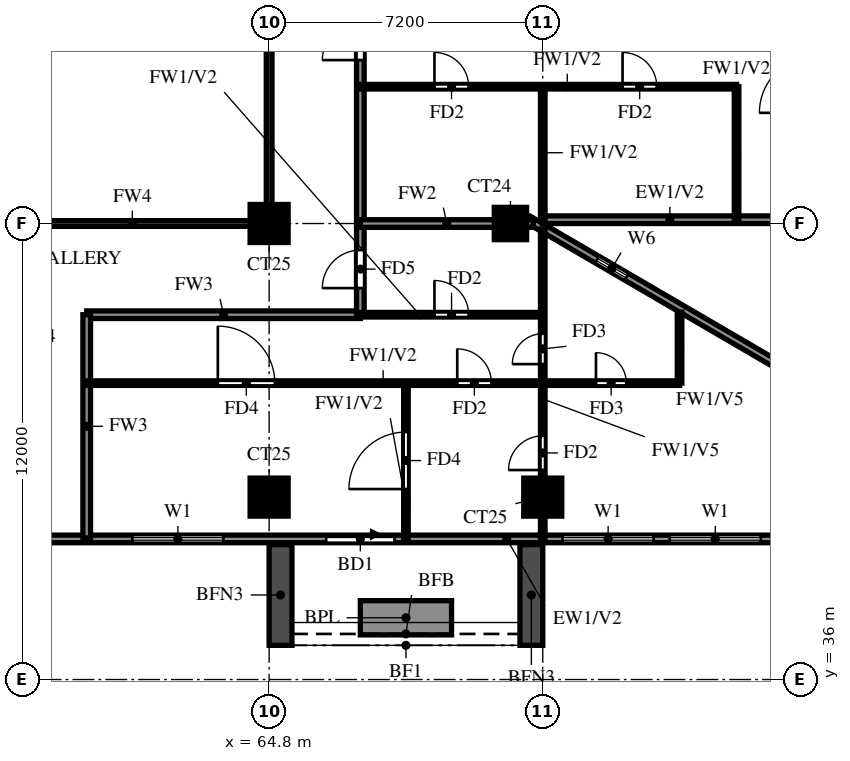
"""IFC4 building model, lengths in metres.
Left out: names, types, materials, properties, quantities, classifications, styles, units other than length and angle.
Written with IfcOpenShell. Run it as: python <this file> out.ifc"""

import sys

from ifc_helpers import new_model, si_unit, direction, frame, frame_2d, origin, origin_2d, place, context, subcontext, project, spatial, rectangle, extrude, source, transform, mapped, element, fill, save


model = new_model("IFC4")
c1 = context("Model", 3, precision=1e-05, world=origin(), true_north=direction((0.0, 1.0)))
c2 = subcontext(c1, "Body", "Model", "MODEL_VIEW")
j1 = project(units=[si_unit("LENGTHUNIT", "METRE"), si_unit("PLANEANGLEUNIT", "RADIAN")], contexts=[c1])
p1 = place(None, origin())
s1 = spatial("IfcSite", under=j1, at=p1, CompositionType="ELEMENT")
p2 = place(p1, origin())
s2 = spatial("IfcBuilding", under=s1, at=p2, CompositionType="ELEMENT")
p3 = place(p2, frame((0.0, 0.0, 167.5)))
s3 = spatial("IfcBuildingStorey", under=s2, at=p3, CompositionType="ELEMENT", Elevation=167.5)
m1 = source(origin(), c2, "Body", "SweptSolid", [
    extrude(rectangle(XDim=1.0, YDim=1.0, at=origin_2d()), origin(), (0.0, 0.0, 1.0), 3.2),
])
for number, where, z_axis, x_axis in (
    (1, (64.8, 40.8, 0.0), (0.0, 0.0, 1.0), (1.0, 0.0, 0.0)),
    (2, (72.0, 40.8, 0.0), (0.0, 0.0, 1.0), (1.0, 0.0, 0.0)),
    (3, (64.8, 48.0, 0.0), (0.0, 0.0, 1.0), (1.0, 0.0, 0.0)),
):
    element("IfcColumn", number, at=place(p3, frame(where, z_axis=z_axis, x_axis=x_axis)), inside=s3, PredefinedType="COLUMN", context=c2, shape_type="MappedRepresentation", body=[
        mapped(m1, transform((0.0, 0.0, 0.0))),
    ])
m2 = source(origin(), c2, "Body", "SweptSolid", [
    extrude(rectangle(XDim=0.85, YDim=0.85, at=origin_2d()), origin(), (0.0, 0.0, 1.0), 3.2),
])
p4 = place(p3, frame((71.15, 48.0, 0.0), z_axis=(0.0, 0.0, 1.0), x_axis=(1.0, 0.0, 0.0)))
e4 = element("IfcColumn", 4, at=p4, inside=s3, PredefinedType="COLUMN", context=c2, shape_type="MappedRepresentation", body=[
    mapped(m2, transform((0.0, 0.0, 0.0))),
])
p5 = place(p3, frame((85.719, 39.881, 0.0), z_axis=(0.0, 0.0, 1.0), x_axis=(-0.86377618652, 0.503875678716, 0.0)))
e5 = element("IfcWall", 5, at=p5, inside=s3, PredefinedType="SOLIDWALL", context=c2, shape_type="SweptSolid", body=[
    extrude(rectangle(XDim=16.311, YDim=0.2, at=frame_2d((8.156, 0.0))), origin(), (0.0, 0.0, 1.0), 3.2),
])
p6 = place(p5, frame((13.326, 0.0, 1.5)))
e6 = element("IfcOpeningElement", 6, at=p6, cuts=e5, PredefinedType="OPENING", context=c2, shape_type="SweptSolid", body=[
    extrude(rectangle(XDim=0.9, YDim=0.9, at=frame_2d((0.45, 0.45))), frame((0.0, 0.11, 0.0), z_axis=(0.0, -1.0, 0.0), x_axis=(1.0, 0.0, 0.0)), (0.0, 0.0, 1.0), 0.22),
])
p7 = place(p3, frame((71.99, 48.1, 0.0), z_axis=(0.0, 0.0, 1.0), x_axis=(1.0, 0.0, 0.0)))
e7 = element("IfcWall", 7, at=p7, inside=s3, PredefinedType="SOLIDWALL", context=c2, shape_type="SweptSolid", body=[
    extrude(rectangle(XDim=6.71, YDim=0.2, at=frame_2d((3.355, 0.0))), origin(), (0.0, 0.0, 1.0), 3.2),
])
p8 = place(p3, frame((58.8, 39.7, 0.0), z_axis=(0.0, 0.0, 1.0), x_axis=(1.0, 0.0, 0.0)))
e8 = element("IfcWall", 8, at=p8, inside=s3, PredefinedType="SOLIDWALL", context=c2, shape_type="SweptSolid", body=[
    extrude(rectangle(XDim=27.23, YDim=0.2, at=frame_2d((13.615, 0.0))), origin(), (0.0, 0.0, 1.0), 3.2),
])
p9 = place(p8, frame((7.5, 0.0, 0.0)))
e9 = element("IfcOpeningElement", 9, at=p9, cuts=e8, PredefinedType="OPENING", context=c2, shape_type="SweptSolid", body=[
    extrude(rectangle(XDim=1.8, YDim=2.4, at=frame_2d((0.9, 1.2))), frame((0.0, 0.11, 0.0), z_axis=(0.0, -1.0, 0.0), x_axis=(1.0, 0.0, 0.0)), (0.0, 0.0, 1.0), 0.22),
])
p10 = place(p8, frame((2.4, 0.0, 0.6)))
e10 = element("IfcOpeningElement", 10, at=p10, cuts=e8, PredefinedType="OPENING", context=c2, shape_type="SweptSolid", body=[
    extrude(rectangle(XDim=2.4, YDim=2.4, at=frame_2d((1.2, 1.2))), frame((0.0, 0.11, 0.0), z_axis=(0.0, -1.0, 0.0), x_axis=(1.0, 0.0, 0.0)), (0.0, 0.0, 1.0), 0.22),
])
p11 = place(p8, frame((13.72, 0.0, 0.6)))
e11 = element("IfcOpeningElement", 11, at=p11, cuts=e8, PredefinedType="OPENING", context=c2, shape_type="SweptSolid", body=[
    extrude(rectangle(XDim=2.4, YDim=2.4, at=frame_2d((1.2, 1.2))), frame((0.0, 0.11, 0.0), z_axis=(0.0, -1.0, 0.0), x_axis=(1.0, 0.0, 0.0)), (0.0, 0.0, 1.0), 0.22),
])
p12 = place(p8, frame((16.541, 0.0, 0.6)))
e12 = element("IfcOpeningElement", 12, at=p12, cuts=e8, PredefinedType="OPENING", context=c2, shape_type="SweptSolid", body=[
    extrude(rectangle(XDim=2.4, YDim=2.4, at=frame_2d((1.2, 1.2))), frame((0.0, 0.11, 0.0), z_axis=(0.0, -1.0, 0.0), x_axis=(1.0, 0.0, 0.0)), (0.0, 0.0, 1.0), 0.22),
])
p13 = place(p8, frame((19.361, 0.0, 0.6)))
e13 = element("IfcOpeningElement", 13, at=p13, cuts=e8, PredefinedType="OPENING", context=c2, shape_type="SweptSolid", body=[
    extrude(rectangle(XDim=2.4, YDim=2.4, at=frame_2d((1.2, 1.2))), frame((0.0, 0.11, 0.0), z_axis=(0.0, -1.0, 0.0), x_axis=(1.0, 0.0, 0.0)), (0.0, 0.0, 1.0), 0.22),
])
p14 = place(p8, frame((22.181, 0.0, 0.6)))
e14 = element("IfcOpeningElement", 14, at=p14, cuts=e8, PredefinedType="OPENING", context=c2, shape_type="SweptSolid", body=[
    extrude(rectangle(XDim=2.4, YDim=2.4, at=frame_2d((1.2, 1.2))), frame((0.0, 0.11, 0.0), z_axis=(0.0, -1.0, 0.0), x_axis=(1.0, 0.0, 0.0)), (0.0, 0.0, 1.0), 0.22),
])
p15 = place(p8, frame((25.99, 0.0, 0.6)))
e15 = element("IfcOpeningElement", 15, at=p15, cuts=e8, PredefinedType="OPENING", context=c2, shape_type="SweptSolid", body=[
    extrude(rectangle(XDim=0.9, YDim=2.4, at=frame_2d((0.45, 1.2))), frame((0.0, 0.11, 0.0), z_axis=(0.0, -1.0, 0.0), x_axis=(1.0, 0.0, 0.0)), (0.0, 0.0, 1.0), 0.22),
])
for number, where, z_axis, x_axis in (
    (16, (65.1, 39.55, 0.0), (0.0, 0.0, 1.0), (0.0, -1.0, 0.0)),
    (17, (71.7, 39.55, 0.0), (0.0, 0.0, 1.0), (0.0, -1.0, 0.0)),
):
    element("IfcWall", number, at=place(p3, frame(where, z_axis=z_axis, x_axis=x_axis)), inside=s3, PredefinedType="SOLIDWALL", context=c2, shape_type="SweptSolid", body=[
        extrude(rectangle(XDim=2.65, YDim=0.6, at=frame_2d((1.325, 0.0))), origin(), (0.0, 0.0, 1.0), 2.85),
    ])
p16 = place(p3, frame((67.2, 37.625, 0.0), z_axis=(0.0, 0.0, 1.0), x_axis=(1.0, 0.0, 0.0)))
e18 = element("IfcWall", 18, at=p16, inside=s3, PredefinedType="SOLIDWALL", context=c2, shape_type="SweptSolid", body=[
    extrude(rectangle(XDim=2.4, YDim=0.9, at=frame_2d((1.2, 0.0))), origin(), (0.0, 0.0, 1.0), 0.9),
])
p17 = place(p3, frame((60.0, 45.6, 0.0), z_axis=(0.0, 0.0, 1.0), x_axis=(1.0, 0.0, 0.0)))
e19 = element("IfcWall", 19, at=p17, inside=s3, PredefinedType="SOLIDWALL", context=c2, shape_type="SweptSolid", body=[
    extrude(rectangle(XDim=7.2, YDim=0.2, at=frame_2d((3.6, 0.0))), origin(), (0.0, 0.0, 1.0), 3.2),
])
p18 = place(p3, frame((60.0, 39.725, 0.0), z_axis=(0.0, 0.0, 1.0), x_axis=(0.0, 1.0, 0.0)))
e20 = element("IfcWall", 20, at=p18, inside=s3, PredefinedType="SOLIDWALL", context=c2, shape_type="SweptSolid", body=[
    extrude(rectangle(XDim=5.875, YDim=0.2, at=frame_2d((2.938, 0.0))), origin(), (0.0, 0.0, 1.0), 3.2),
])
p19 = place(p3, frame((67.2, 45.6, 0.0), z_axis=(0.0, 0.0, 1.0), x_axis=(0.0, 1.0, 0.0)))
e21 = element("IfcWall", 21, at=p19, inside=s3, PredefinedType="SOLIDWALL", context=c2, shape_type="SweptSolid", body=[
    extrude(rectangle(XDim=16.8, YDim=0.2, at=frame_2d((8.4, 0.0))), origin(), (0.0, 0.0, 1.0), 3.2),
])
p20 = place(p19, frame((6.7, 0.0, 0.0)))
e22 = element("IfcOpeningElement", 22, at=p20, cuts=e21, PredefinedType="OPENING", context=c2, shape_type="SweptSolid", body=[
    extrude(rectangle(XDim=1.0, YDim=2.1, at=frame_2d((0.5, 1.05))), frame((0.0, 0.11, 0.0), z_axis=(0.0, -1.0, 0.0), x_axis=(1.0, 0.0, 0.0)), (0.0, 0.0, 1.0), 0.22),
])
p21 = place(p19, frame((15.1, 0.0, 0.0)))
e23 = element("IfcOpeningElement", 23, at=p21, cuts=e21, PredefinedType="OPENING", context=c2, shape_type="SweptSolid", body=[
    extrude(rectangle(XDim=1.0, YDim=2.1, at=frame_2d((0.5, 1.05))), frame((0.0, 0.11, 0.0), z_axis=(0.0, -1.0, 0.0), x_axis=(1.0, 0.0, 0.0)), (0.0, 0.0, 1.0), 0.22),
])
p22 = place(p19, frame((0.7, 0.0, 0.0)))
e24 = element("IfcOpeningElement", 24, at=p22, cuts=e21, PredefinedType="OPENING", context=c2, shape_type="SweptSolid", body=[
    extrude(rectangle(XDim=1.0, YDim=2.1, at=frame_2d((0.5, 1.05))), frame((0.0, 0.11, 0.0), z_axis=(0.0, -1.0, 0.0), x_axis=(1.0, 0.0, 0.0)), (0.0, 0.0, 1.0), 0.22),
])
p23 = place(p3, frame((67.2, 48.0, 0.0), z_axis=(0.0, 0.0, 1.0), x_axis=(1.0, 0.0, 0.0)))
e25 = element("IfcWall", 25, at=p23, inside=s3, PredefinedType="SOLIDWALL", context=c2, shape_type="SweptSolid", body=[
    extrude(rectangle(XDim=4.552, YDim=0.2, at=frame_2d((2.276, 0.0))), origin(), (0.0, 0.0, 1.0), 3.2),
])
p24 = place(p3, frame((60.0, 43.8, 0.0), z_axis=(0.0, 0.0, 1.0), x_axis=(1.0, 0.0, 0.0)))
e26 = element("IfcWall", 26, at=p24, inside=s3, PredefinedType="PARTITIONING", context=c2, shape_type="SweptSolid", body=[
    extrude(rectangle(XDim=15.6, YDim=0.12, at=frame_2d((7.8, 0.0))), origin(), (0.0, 0.0, 1.0), 3.2),
])
p25 = place(p24, frame((9.75, 0.0, 0.0)))
e27 = element("IfcOpeningElement", 27, at=p25, cuts=e26, PredefinedType="OPENING", context=c2, shape_type="SweptSolid", body=[
    extrude(rectangle(XDim=0.9, YDim=2.1, at=frame_2d((0.45, 1.05))), frame((0.0, 0.07, 0.0), z_axis=(0.0, -1.0, 0.0), x_axis=(1.0, 0.0, 0.0)), (0.0, 0.0, 1.0), 0.14),
])
p26 = place(p24, frame((3.45, 0.0, 0.0)))
e28 = element("IfcOpeningElement", 28, at=p26, cuts=e26, PredefinedType="OPENING", context=c2, shape_type="SweptSolid", body=[
    extrude(rectangle(XDim=1.5, YDim=2.1, at=frame_2d((0.75, 1.05))), frame((0.0, 0.07, 0.0), z_axis=(0.0, -1.0, 0.0), x_axis=(1.0, 0.0, 0.0)), (0.0, 0.0, 1.0), 0.14),
])
p27 = place(p24, frame((13.4, 0.0, 0.0)))
e29 = element("IfcOpeningElement", 29, at=p27, cuts=e26, PredefinedType="OPENING", context=c2, shape_type="SweptSolid", body=[
    extrude(rectangle(XDim=0.8, YDim=2.1, at=frame_2d((0.4, 1.05))), frame((0.0, 0.07, 0.0), z_axis=(0.0, -1.0, 0.0), x_axis=(1.0, 0.0, 0.0)), (0.0, 0.0, 1.0), 0.14),
])
p28 = place(p3, frame((67.2, 45.6, 0.0), z_axis=(0.0, 0.0, 1.0), x_axis=(1.0, 0.0, 0.0)))
e30 = element("IfcWall", 30, at=p28, inside=s3, PredefinedType="PARTITIONING", context=c2, shape_type="SweptSolid", body=[
    extrude(rectangle(XDim=4.8, YDim=0.12, at=frame_2d((2.4, 0.0))), origin(), (0.0, 0.0, 1.0), 3.2),
])
p29 = place(p28, frame((1.95, 0.0, 0.0)))
e31 = element("IfcOpeningElement", 31, at=p29, cuts=e30, PredefinedType="OPENING", context=c2, shape_type="SweptSolid", body=[
    extrude(rectangle(XDim=0.9, YDim=2.1, at=frame_2d((0.45, 1.05))), frame((0.0, 0.07, 0.0), z_axis=(0.0, -1.0, 0.0), x_axis=(1.0, 0.0, 0.0)), (0.0, 0.0, 1.0), 0.14),
])
p30 = place(p3, frame((67.2, 51.6, 0.0), z_axis=(0.0, 0.0, 1.0), x_axis=(1.0, 0.0, 0.0)))
e32 = element("IfcWall", 32, at=p30, inside=s3, PredefinedType="PARTITIONING", context=c2, shape_type="SweptSolid", body=[
    extrude(rectangle(XDim=9.9, YDim=0.12, at=frame_2d((4.95, 0.0))), origin(), (0.0, 0.0, 1.0), 3.2),
])
p31 = place(p30, frame((6.9, 0.0, 0.0)))
e33 = element("IfcOpeningElement", 33, at=p31, cuts=e32, PredefinedType="OPENING", context=c2, shape_type="SweptSolid", body=[
    extrude(rectangle(XDim=0.9, YDim=2.1, at=frame_2d((0.45, 1.05))), frame((0.0, 0.07, 0.0), z_axis=(0.0, -1.0, 0.0), x_axis=(1.0, 0.0, 0.0)), (0.0, 0.0, 1.0), 0.14),
])
p32 = place(p30, frame((1.95, 0.0, 0.0)))
e34 = element("IfcOpeningElement", 34, at=p32, cuts=e32, PredefinedType="OPENING", context=c2, shape_type="SweptSolid", body=[
    extrude(rectangle(XDim=0.9, YDim=2.1, at=frame_2d((0.45, 1.05))), frame((0.0, 0.07, 0.0), z_axis=(0.0, -1.0, 0.0), x_axis=(1.0, 0.0, 0.0)), (0.0, 0.0, 1.0), 0.14),
])
p33 = place(p3, frame((68.4, 39.725, 0.0), z_axis=(0.0, 0.0, 1.0), x_axis=(0.0, 1.0, 0.0)))
e35 = element("IfcWall", 35, at=p33, inside=s3, PredefinedType="PARTITIONING", context=c2, shape_type="SweptSolid", body=[
    extrude(rectangle(XDim=4.075, YDim=0.12, at=frame_2d((2.038, 0.0))), origin(), (0.0, 0.0, 1.0), 3.2),
])
p34 = place(p33, frame((1.288, 0.0, 0.0)))
e36 = element("IfcOpeningElement", 36, at=p34, cuts=e35, PredefinedType="OPENING", context=c2, shape_type="SweptSolid", body=[
    extrude(rectangle(XDim=1.5, YDim=2.1, at=frame_2d((0.75, 1.05))), frame((0.0, 0.07, 0.0), z_axis=(0.0, -1.0, 0.0), x_axis=(1.0, 0.0, 0.0)), (0.0, 0.0, 1.0), 0.14),
])
p35 = place(p3, frame((72.0, 39.725, 0.0), z_axis=(0.0, 0.0, 1.0), x_axis=(0.0, 1.0, 0.0)))
e37 = element("IfcWall", 37, at=p35, inside=s3, PredefinedType="PARTITIONING", context=c2, shape_type="SweptSolid", body=[
    extrude(rectangle(XDim=8.13, YDim=0.12, at=frame_2d((4.065, 0.0))), origin(), (0.0, 0.0, 1.0), 2.3),
])
p36 = place(p35, frame((1.788, 0.0, 0.0)))
e38 = element("IfcOpeningElement", 38, at=p36, cuts=e37, PredefinedType="OPENING", context=c2, shape_type="SweptSolid", body=[
    extrude(rectangle(XDim=0.9, YDim=2.1, at=frame_2d((0.45, 1.05))), frame((0.0, 0.07, 0.0), z_axis=(0.0, -1.0, 0.0), x_axis=(1.0, 0.0, 0.0)), (0.0, 0.0, 1.0), 0.14),
])
p37 = place(p35, frame((4.575, 0.0, 0.0)))
e39 = element("IfcOpeningElement", 39, at=p37, cuts=e37, PredefinedType="OPENING", context=c2, shape_type="SweptSolid", body=[
    extrude(rectangle(XDim=0.8, YDim=2.1, at=frame_2d((0.4, 1.05))), frame((0.0, 0.07, 0.0), z_axis=(0.0, -1.0, 0.0), x_axis=(1.0, 0.0, 0.0)), (0.0, 0.0, 1.0), 0.14),
])
p38 = place(p3, frame((72.0, 48.125, 0.0), z_axis=(0.0, 0.0, 1.0), x_axis=(0.0, 1.0, 0.0)))
e40 = element("IfcWall", 40, at=p38, inside=s3, PredefinedType="PARTITIONING", context=c2, shape_type="SweptSolid", body=[
    extrude(rectangle(XDim=3.475, YDim=0.12, at=frame_2d((1.738, 0.0))), origin(), (0.0, 0.0, 1.0), 3.2),
])
p39 = place(p3, frame((75.6, 43.8, 0.0), z_axis=(0.0, 0.0, 1.0), x_axis=(0.0, 1.0, 0.0)))
e41 = element("IfcWall", 41, at=p39, inside=s3, PredefinedType="PARTITIONING", context=c2, shape_type="SweptSolid", body=[
    extrude(rectangle(XDim=1.868, YDim=0.12, at=frame_2d((0.934, 0.0))), origin(), (0.0, 0.0, 1.0), 2.3),
])
p40 = place(p3, frame((77.1, 48.125, 0.0), z_axis=(0.0, 0.0, 1.0), x_axis=(0.0, 1.0, 0.0)))
e42 = element("IfcWall", 42, at=p40, inside=s3, PredefinedType="PARTITIONING", context=c2, shape_type="SweptSolid", body=[
    extrude(rectangle(XDim=3.475, YDim=0.12, at=frame_2d((1.738, 0.0))), origin(), (0.0, 0.0, 1.0), 3.2),
])
p41 = place(p3, frame((57.6, 48.0, 0.0), z_axis=(0.0, 0.0, 1.0), x_axis=(1.0, 0.0, 0.0)))
e43 = element("IfcWall", 43, at=p41, inside=s3, PredefinedType="SOLIDWALL", context=c2, shape_type="SweptSolid", body=[
    extrude(rectangle(XDim=7.2, YDim=0.15, at=frame_2d((3.6, 0.0))), origin(), (0.0, 0.0, 1.0), 2.3),
])
p42 = place(p3, frame((64.8, 48.0, 0.0), z_axis=(0.0, 0.0, 1.0), x_axis=(0.0, 1.0, 0.0)))
e44 = element("IfcWall", 44, at=p42, inside=s3, PredefinedType="SOLIDWALL", context=c2, shape_type="SweptSolid", body=[
    extrude(rectangle(XDim=14.4, YDim=0.15, at=frame_2d((7.2, 0.0))), origin(), (0.0, 0.0, 1.0), 2.3),
])
p43 = place(p6, origin())
e45 = element("IfcWindow", 45, at=p43, inside=s3, PartitioningType="SINGLE_PANEL", PredefinedType="WINDOW", context=c2, shape_type="SweptSolid", body=[
    extrude(rectangle(XDim=0.9, YDim=0.9, at=frame_2d((0.45, 0.45))), frame((0.0, 0.03, 0.0), z_axis=(0.0, -1.0, 0.0), x_axis=(1.0, 0.0, 0.0)), (0.0, 0.0, 1.0), 0.06),
])
fill(e6, e45)
p44 = place(p9, origin())
e46 = element("IfcDoor", 46, at=p44, inside=s3, OperationType="DOUBLE_DOOR_SLIDING", PredefinedType="DOOR", context=c2, shape_type="SweptSolid", body=[
    extrude(rectangle(XDim=1.8, YDim=2.4, at=frame_2d((0.9, 1.2))), frame((0.0, 0.025, 0.0), z_axis=(0.0, -1.0, 0.0), x_axis=(1.0, 0.0, 0.0)), (0.0, 0.0, 1.0), 0.05),
])
fill(e9, e46)
p45 = place(p10, origin())
e47 = element("IfcWindow", 47, at=p45, inside=s3, PartitioningType="DOUBLE_PANEL_VERTICAL", PredefinedType="WINDOW", context=c2, shape_type="SweptSolid", body=[
    extrude(rectangle(XDim=2.4, YDim=2.4, at=frame_2d((1.2, 1.2))), frame((0.0, 0.03, 0.0), z_axis=(0.0, -1.0, 0.0), x_axis=(1.0, 0.0, 0.0)), (0.0, 0.0, 1.0), 0.06),
])
fill(e10, e47)
p46 = place(p11, origin())
e48 = element("IfcWindow", 48, at=p46, inside=s3, PartitioningType="DOUBLE_PANEL_VERTICAL", PredefinedType="WINDOW", context=c2, shape_type="SweptSolid", body=[
    extrude(rectangle(XDim=2.4, YDim=2.4, at=frame_2d((1.2, 1.2))), frame((0.0, 0.03, 0.0), z_axis=(0.0, -1.0, 0.0), x_axis=(1.0, 0.0, 0.0)), (0.0, 0.0, 1.0), 0.06),
])
fill(e11, e48)
p47 = place(p12, origin())
e49 = element("IfcWindow", 49, at=p47, inside=s3, PartitioningType="DOUBLE_PANEL_VERTICAL", PredefinedType="WINDOW", context=c2, shape_type="SweptSolid", body=[
    extrude(rectangle(XDim=2.4, YDim=2.4, at=frame_2d((1.2, 1.2))), frame((0.0, 0.03, 0.0), z_axis=(0.0, -1.0, 0.0), x_axis=(1.0, 0.0, 0.0)), (0.0, 0.0, 1.0), 0.06),
])
fill(e12, e49)
p48 = place(p20, origin())
e50 = element("IfcDoor", 50, at=p48, inside=s3, OperationType="SINGLE_SWING_LEFT", PredefinedType="DOOR", context=c2, shape_type="SweptSolid", body=[
    extrude(rectangle(XDim=1.0, YDim=2.1, at=frame_2d((0.5, 1.05))), frame((0.0, 0.025, 0.0), z_axis=(0.0, -1.0, 0.0), x_axis=(1.0, 0.0, 0.0)), (0.0, 0.0, 1.0), 0.05),
])
fill(e22, e50)
p49 = place(p31, origin())
e51 = element("IfcDoor", 51, at=p49, inside=s3, OperationType="SINGLE_SWING_RIGHT", PredefinedType="DOOR", context=c2, shape_type="SweptSolid", body=[
    extrude(rectangle(XDim=0.9, YDim=2.1, at=frame_2d((0.45, 1.05))), frame((0.0, 0.025, 0.0), z_axis=(0.0, -1.0, 0.0), x_axis=(1.0, 0.0, 0.0)), (0.0, 0.0, 1.0), 0.05),
])
fill(e33, e51)
p50 = place(p32, origin())
e52 = element("IfcDoor", 52, at=p50, inside=s3, OperationType="SINGLE_SWING_RIGHT", PredefinedType="DOOR", context=c2, shape_type="SweptSolid", body=[
    extrude(rectangle(XDim=0.9, YDim=2.1, at=frame_2d((0.45, 1.05))), frame((0.0, 0.025, 0.0), z_axis=(0.0, -1.0, 0.0), x_axis=(1.0, 0.0, 0.0)), (0.0, 0.0, 1.0), 0.05),
])
fill(e34, e52)
p51 = place(p34, origin())
e53 = element("IfcDoor", 53, at=p51, inside=s3, OperationType="SINGLE_SWING_RIGHT", PredefinedType="DOOR", context=c2, shape_type="SweptSolid", body=[
    extrude(rectangle(XDim=1.5, YDim=2.1, at=frame_2d((0.75, 1.05))), frame((0.0, 0.025, 0.0), z_axis=(0.0, -1.0, 0.0), x_axis=(1.0, 0.0, 0.0)), (0.0, 0.0, 1.0), 0.05),
])
fill(e36, e53)
p52 = place(p29, origin())
e54 = element("IfcDoor", 54, at=p52, inside=s3, OperationType="SINGLE_SWING_LEFT", PredefinedType="DOOR", context=c2, shape_type="SweptSolid", body=[
    extrude(rectangle(XDim=0.9, YDim=2.1, at=frame_2d((0.45, 1.05))), frame((0.0, 0.025, 0.0), z_axis=(0.0, -1.0, 0.0), x_axis=(1.0, 0.0, 0.0)), (0.0, 0.0, 1.0), 0.05),
])
fill(e31, e54)
p53 = place(p22, origin())
e55 = element("IfcDoor", 55, at=p53, inside=s3, OperationType="SINGLE_SWING_LEFT", PredefinedType="DOOR", context=c2, shape_type="SweptSolid", body=[
    extrude(rectangle(XDim=1.0, YDim=2.1, at=frame_2d((0.5, 1.05))), frame((0.0, 0.025, 0.0), z_axis=(0.0, -1.0, 0.0), x_axis=(1.0, 0.0, 0.0)), (0.0, 0.0, 1.0), 0.05),
])
fill(e24, e55)
p54 = place(p25, origin())
e56 = element("IfcDoor", 56, at=p54, inside=s3, OperationType="SINGLE_SWING_RIGHT", PredefinedType="DOOR", context=c2, shape_type="SweptSolid", body=[
    extrude(rectangle(XDim=0.9, YDim=2.1, at=frame_2d((0.45, 1.05))), frame((0.0, 0.025, 0.0), z_axis=(0.0, -1.0, 0.0), x_axis=(1.0, 0.0, 0.0)), (0.0, 0.0, 1.0), 0.05),
])
fill(e27, e56)
p55 = place(p26, origin())
e57 = element("IfcDoor", 57, at=p55, inside=s3, OperationType="SINGLE_SWING_LEFT", PredefinedType="DOOR", context=c2, shape_type="SweptSolid", body=[
    extrude(rectangle(XDim=1.5, YDim=2.1, at=frame_2d((0.75, 1.05))), frame((0.0, 0.025, 0.0), z_axis=(0.0, -1.0, 0.0), x_axis=(1.0, 0.0, 0.0)), (0.0, 0.0, 1.0), 0.05),
])
fill(e28, e57)
p56 = place(p36, origin())
e58 = element("IfcDoor", 58, at=p56, inside=s3, OperationType="SINGLE_SWING_RIGHT", PredefinedType="DOOR", context=c2, shape_type="SweptSolid", body=[
    extrude(rectangle(XDim=0.9, YDim=2.1, at=frame_2d((0.45, 1.05))), frame((0.0, 0.025, 0.0), z_axis=(0.0, -1.0, 0.0), x_axis=(1.0, 0.0, 0.0)), (0.0, 0.0, 1.0), 0.05),
])
fill(e38, e58)
p57 = place(p37, origin())
e59 = element("IfcDoor", 59, at=p57, inside=s3, OperationType="SINGLE_SWING_RIGHT", PredefinedType="DOOR", context=c2, shape_type="SweptSolid", body=[
    extrude(rectangle(XDim=0.8, YDim=2.1, at=frame_2d((0.4, 1.05))), frame((0.0, 0.025, 0.0), z_axis=(0.0, -1.0, 0.0), x_axis=(1.0, 0.0, 0.0)), (0.0, 0.0, 1.0), 0.05),
])
fill(e39, e59)
p58 = place(p27, origin())
e60 = element("IfcDoor", 60, at=p58, inside=s3, OperationType="SINGLE_SWING_LEFT", PredefinedType="DOOR", context=c2, shape_type="SweptSolid", body=[
    extrude(rectangle(XDim=0.8, YDim=2.1, at=frame_2d((0.4, 1.05))), frame((0.0, 0.025, 0.0), z_axis=(0.0, -1.0, 0.0), x_axis=(1.0, 0.0, 0.0)), (0.0, 0.0, 1.0), 0.05),
])
fill(e29, e60)
save(model, sys.argv[1])
